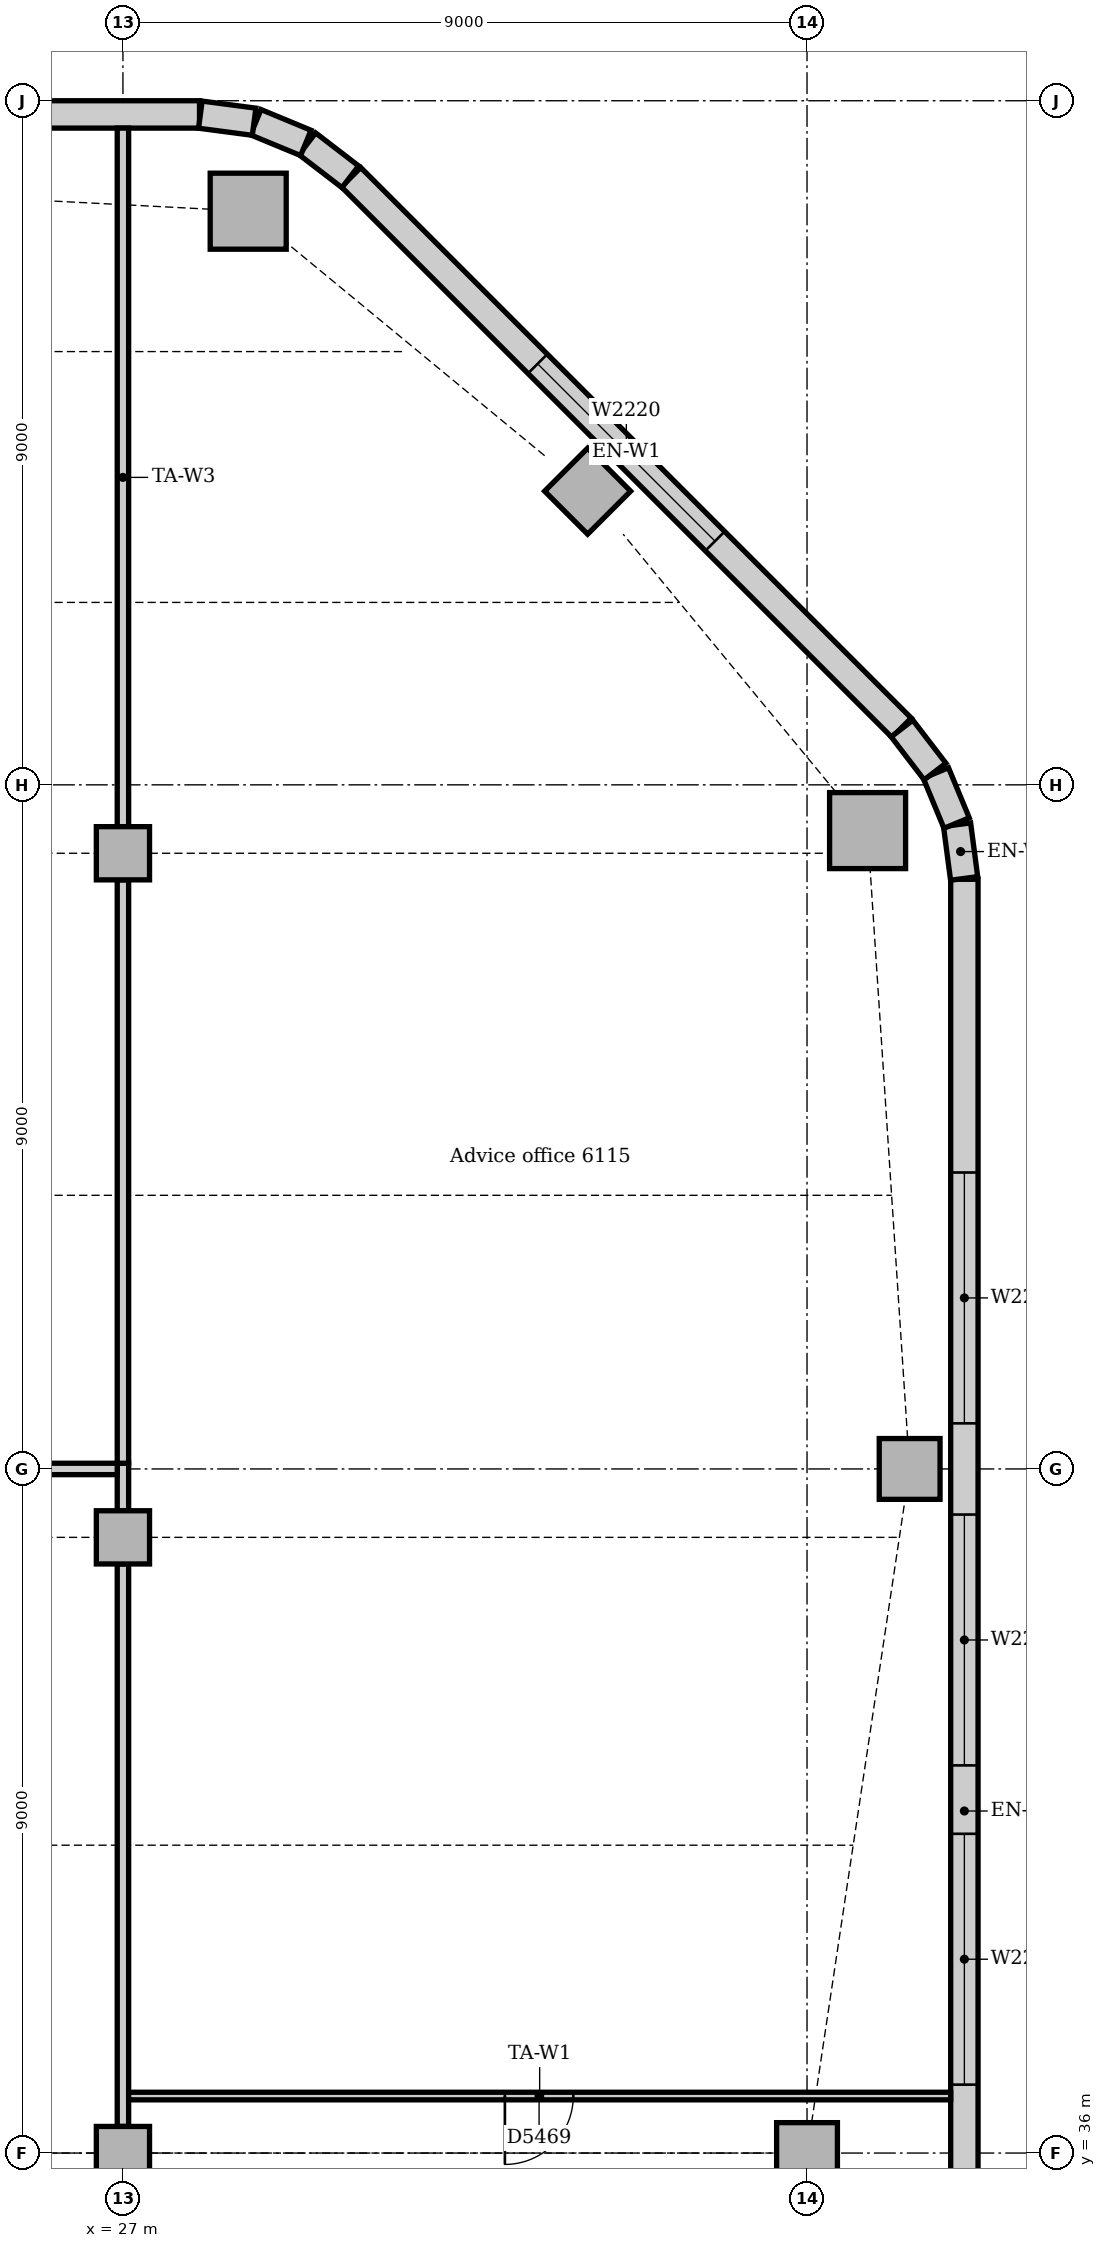
"""IFC4 building model, lengths in metres.
Left out: names, types, materials, properties, quantities, classifications, styles, units other than length and angle.
Written with IfcOpenShell. Run it as: python <this file> out.ifc"""

import sys

from ifc_helpers import new_model, si_unit, direction, frame, frame_2d, origin, origin_2d, place, context, subcontext, project, spatial, rectangle, extrude, element, fill, save


model = new_model("IFC4")
c1 = context("Model", 3, precision=1e-05, world=origin(), true_north=direction((0.0, 1.0)))
c2 = subcontext(c1, "Body", "Model", "MODEL_VIEW")
j1 = project(units=[si_unit("LENGTHUNIT", "METRE"), si_unit("PLANEANGLEUNIT", "RADIAN")], contexts=[c1])
p1 = place(None, origin())
s1 = spatial("IfcSite", under=j1, at=p1, CompositionType="ELEMENT")
p2 = place(p1, origin())
s2 = spatial("IfcBuilding", under=s1, at=p2, CompositionType="ELEMENT")
p3 = place(p2, frame((0.0, 0.0, 255.0)))
s3 = spatial("IfcBuildingStorey", under=s2, at=p3, CompositionType="ELEMENT", Elevation=255.0)
for number, where, z_axis, x_axis in (
    (1, (36.797, 53.398, 0.0), (0.0, 0.0, 1.0), (1.0, 0.0, 0.0)),
    (2, (28.648, 61.547, 0.0), (0.0, 0.0, 1.0), (1.0, 0.0, 0.0)),
):
    element("IfcColumn", number, at=place(p3, frame(where, z_axis=z_axis, x_axis=x_axis)), inside=s3, PredefinedType="COLUMN", context=c2, shape_type="SweptSolid", body=[
        extrude(rectangle(XDim=1.0, YDim=1.0, at=origin_2d()), origin(), (0.0, 0.0, 1.0), 3.85),
    ])
for number, where, z_axis, x_axis in (
    (3, (36.0, 36.0, 0.0), (0.0, 0.0, 1.0), (1.0, 0.0, 0.0)),
    (4, (37.35, 45.0, 0.0), (0.0, 0.0, 1.0), (1.0, 0.0, 0.0)),
    (5, (33.114, 57.864, 0.0), (0.0, 0.0, 1.0), (0.707, 0.707, 0.0)),
):
    element("IfcColumn", number, at=place(p3, frame(where, z_axis=z_axis, x_axis=x_axis)), inside=s3, PredefinedType="COLUMN", context=c2, shape_type="SweptSolid", body=[
        extrude(rectangle(XDim=0.8, YDim=0.8, at=origin_2d()), origin(), (0.0, 0.0, 1.0), 3.85),
    ])
for number, where, z_axis, x_axis in (
    (6, (27.0, 36.0, 0.0), (0.0, 0.0, 1.0), (1.0, 0.0, 0.0)),
    (7, (27.0, 44.1, 0.0), (0.0, 0.0, 1.0), (1.0, 0.0, 0.0)),
    (8, (27.0, 53.1, 0.0), (0.0, 0.0, 1.0), (1.0, 0.0, 0.0)),
):
    element("IfcColumn", number, at=place(p3, frame(where, z_axis=z_axis, x_axis=x_axis)), inside=s3, PredefinedType="COLUMN", context=c2, shape_type="SweptSolid", body=[
        extrude(rectangle(XDim=0.7, YDim=0.7, at=origin_2d()), origin(), (0.0, 0.0, 1.0), 3.85),
    ])
p4 = place(p3, frame((38.07, 28.243, 0.0), z_axis=(0.0, 0.0, 1.0), x_axis=(0.0, 1.0, 0.0)))
e9 = element("IfcWall", 9, at=p4, inside=s3, PredefinedType="STANDARD", context=c2, shape_type="SweptSolid", body=[
    extrude(rectangle(XDim=24.515, YDim=0.36, at=frame_2d((12.257, 0.0))), origin(), (0.0, 0.0, 1.0), 3.85),
])
p5 = place(p4, frame((3.857, 0.0, 0.9)))
e10 = element("IfcOpeningElement", 10, at=p5, cuts=e9, PredefinedType="OPENING", context=c2, shape_type="SweptSolid", body=[
    extrude(rectangle(XDim=3.3, YDim=1.6, at=frame_2d((1.65, 0.8))), frame((0.0, 0.19, 0.0), z_axis=(0.0, -1.0, 0.0), x_axis=(1.0, 0.0, 0.0)), (0.0, 0.0, 1.0), 0.38),
])
p6 = place(p4, frame((8.657, 0.0, 0.9)))
e11 = element("IfcOpeningElement", 11, at=p6, cuts=e9, PredefinedType="OPENING", context=c2, shape_type="SweptSolid", body=[
    extrude(rectangle(XDim=3.3, YDim=1.6, at=frame_2d((1.65, 0.8))), frame((0.0, 0.19, 0.0), z_axis=(0.0, -1.0, 0.0), x_axis=(1.0, 0.0, 0.0)), (0.0, 0.0, 1.0), 0.38),
])
p7 = place(p4, frame((12.857, 0.0, 0.9)))
e12 = element("IfcOpeningElement", 12, at=p7, cuts=e9, PredefinedType="OPENING", context=c2, shape_type="SweptSolid", body=[
    extrude(rectangle(XDim=3.3, YDim=1.6, at=frame_2d((1.65, 0.8))), frame((0.0, 0.19, 0.0), z_axis=(0.0, -1.0, 0.0), x_axis=(1.0, 0.0, 0.0)), (0.0, 0.0, 1.0), 0.38),
])
p8 = place(p4, frame((17.357, 0.0, 0.9)))
e13 = element("IfcOpeningElement", 13, at=p8, cuts=e9, PredefinedType="OPENING", context=c2, shape_type="SweptSolid", body=[
    extrude(rectangle(XDim=3.3, YDim=1.6, at=frame_2d((1.65, 0.8))), frame((0.0, 0.19, 0.0), z_axis=(0.0, -1.0, 0.0), x_axis=(1.0, 0.0, 0.0)), (0.0, 0.0, 1.0), 0.38),
])
p9 = place(p3, frame((37.244, 54.751, 0.0), z_axis=(0.0, 0.0, 1.0), x_axis=(-0.707106781187, 0.707106781187, 0.0)))
e14 = element("IfcWall", 14, at=p9, inside=s3, PredefinedType="STANDARD", context=c2, shape_type="SweptSolid", body=[
    extrude(rectangle(XDim=10.243, YDim=0.36, at=frame_2d((5.121, 0.0))), origin(), (0.0, 0.0, 1.0), 3.85),
])
p10 = place(p9, frame((3.471, 0.0, 0.9)))
e15 = element("IfcOpeningElement", 15, at=p10, cuts=e14, PredefinedType="OPENING", context=c2, shape_type="SweptSolid", body=[
    extrude(rectangle(XDim=3.3, YDim=1.6, at=frame_2d((1.65, 0.8))), frame((0.0, 0.19, 0.0), z_axis=(0.0, -1.0, 0.0), x_axis=(1.0, 0.0, 0.0)), (0.0, 0.0, 1.0), 0.38),
])
p11 = place(p3, frame((28.007, 62.82, 0.0), z_axis=(0.0, 0.0, 1.0), x_axis=(-1.0, 0.0, 0.0)))
e16 = element("IfcWall", 16, at=p11, inside=s3, PredefinedType="STANDARD", context=c2, shape_type="SweptSolid", body=[
    extrude(rectangle(XDim=23.765, YDim=0.36, at=frame_2d((11.882, 0.0))), origin(), (0.0, 0.0, 1.0), 3.85),
])
p12 = place(p11, frame((3.482, 0.0, 0.9)))
e17 = element("IfcOpeningElement", 17, at=p12, cuts=e16, PredefinedType="OPENING", context=c2, shape_type="SweptSolid", body=[
    extrude(rectangle(XDim=3.3, YDim=1.6, at=frame_2d((1.65, 0.8))), frame((0.0, 0.19, 0.0), z_axis=(0.0, -1.0, 0.0), x_axis=(1.0, 0.0, 0.0)), (0.0, 0.0, 1.0), 0.38),
])
p13 = place(p11, frame((8.732, 0.0, 0.9)))
e18 = element("IfcOpeningElement", 18, at=p13, cuts=e16, PredefinedType="OPENING", context=c2, shape_type="SweptSolid", body=[
    extrude(rectangle(XDim=1.8, YDim=1.6, at=frame_2d((0.9, 0.8))), frame((0.0, 0.19, 0.0), z_axis=(0.0, -1.0, 0.0), x_axis=(1.0, 0.0, 0.0)), (0.0, 0.0, 1.0), 0.38),
])
p14 = place(p11, frame((12.482, 0.0, 0.9)))
e19 = element("IfcOpeningElement", 19, at=p14, cuts=e16, PredefinedType="OPENING", context=c2, shape_type="SweptSolid", body=[
    extrude(rectangle(XDim=3.3, YDim=1.6, at=frame_2d((1.65, 0.8))), frame((0.0, 0.19, 0.0), z_axis=(0.0, -1.0, 0.0), x_axis=(1.0, 0.0, 0.0)), (0.0, 0.0, 1.0), 0.38),
])
p15 = place(p11, frame((16.982, 0.0, 0.9)))
e20 = element("IfcOpeningElement", 20, at=p15, cuts=e16, PredefinedType="OPENING", context=c2, shape_type="SweptSolid", body=[
    extrude(rectangle(XDim=3.3, YDim=1.6, at=frame_2d((1.65, 0.8))), frame((0.0, 0.19, 0.0), z_axis=(0.0, -1.0, 0.0), x_axis=(1.0, 0.0, 0.0)), (0.0, 0.0, 1.0), 0.38),
])
for number, where, z_axis, x_axis in (
    (21, (38.067, 52.769, 0.0), (0.0, 0.0, 1.0), (-0.131, 0.991, 0.0)),
    (22, (37.968, 53.497, 0.0), (0.0, 0.0, 1.0), (-0.383, 0.924, 0.0)),
):
    element("IfcWall", number, at=place(p3, frame(where, z_axis=z_axis, x_axis=x_axis)), inside=s3, PredefinedType="STANDARD", context=c2, shape_type="SweptSolid", body=[
        extrude(rectangle(XDim=0.713, YDim=0.36, at=frame_2d((0.356, 0.0))), origin(), (0.0, 0.0, 1.0), 3.85),
    ])
for number, where, z_axis, x_axis in (
    (23, (37.684, 54.175, 0.0), (0.0, 0.0, 1.0), (-0.609, 0.793, 0.0)),
    (24, (29.991, 62.0, 0.0), (0.0, 0.0, 1.0), (-0.793, 0.609, 0.0)),
):
    element("IfcWall", number, at=place(p3, frame(where, z_axis=z_axis, x_axis=x_axis)), inside=s3, PredefinedType="STANDARD", context=c2, shape_type="SweptSolid", body=[
        extrude(rectangle(XDim=0.713, YDim=0.36, at=frame_2d((0.357, 0.0))), origin(), (0.0, 0.0, 1.0), 3.85),
    ])
for number, where, z_axis, x_axis in (
    (25, (29.406, 62.445, 0.0), (0.0, 0.0, 1.0), (-0.924, 0.383, 0.0)),
    (26, (28.726, 62.724, 0.0), (0.0, 0.0, 1.0), (-0.991, 0.131, 0.0)),
):
    element("IfcWall", number, at=place(p3, frame(where, z_axis=z_axis, x_axis=x_axis)), inside=s3, PredefinedType="STANDARD", context=c2, shape_type="SweptSolid", body=[
        extrude(rectangle(XDim=0.713, YDim=0.36, at=frame_2d((0.356, 0.0))), origin(), (0.0, 0.0, 1.0), 3.85),
    ])
p16 = place(p3, frame((27.0, 36.35, 0.0), z_axis=(0.0, 0.0, 1.0), x_axis=(0.0, 1.0, 0.0)))
e27 = element("IfcWall", 27, at=p16, inside=s3, PredefinedType="PARTITIONING", context=c2, shape_type="SweptSolid", body=[
    extrude(rectangle(XDim=7.4, YDim=0.15, at=frame_2d((3.7, 0.0))), origin(), (0.0, 0.0, 1.0), 3.4),
])
p17 = place(p3, frame((27.0, 44.45, 0.0), z_axis=(0.0, 0.0, 1.0), x_axis=(0.0, 1.0, 0.0)))
e28 = element("IfcWall", 28, at=p17, inside=s3, PredefinedType="PARTITIONING", context=c2, shape_type="SweptSolid", body=[
    extrude(rectangle(XDim=0.625, YDim=0.15, at=frame_2d((0.312, 0.0))), origin(), (0.0, 0.0, 1.0), 3.4),
])
p18 = place(p3, frame((22.425, 45.0, 0.0), z_axis=(0.0, 0.0, 1.0), x_axis=(1.0, 0.0, 0.0)))
e29 = element("IfcWall", 29, at=p18, inside=s3, PredefinedType="PARTITIONING", context=c2, shape_type="SweptSolid", body=[
    extrude(rectangle(XDim=4.5, YDim=0.15, at=frame_2d((2.25, 0.0))), origin(), (0.0, 0.0, 1.0), 3.85),
])
p19 = place(p18, frame((1.75, 0.0, 0.0)))
e30 = element("IfcOpeningElement", 30, at=p19, cuts=e29, PredefinedType="OPENING", context=c2, shape_type="SweptSolid", body=[
    extrude(rectangle(XDim=1.0, YDim=2.1, at=frame_2d((0.5, 1.05))), frame((0.0, 0.085, 0.0), z_axis=(0.0, -1.0, 0.0), x_axis=(1.0, 0.0, 0.0)), (0.0, 0.0, 1.0), 0.17),
])
p20 = place(p3, frame((27.0, 53.45, 0.0), z_axis=(0.0, 0.0, 1.0), x_axis=(0.0, 1.0, 0.0)))
e31 = element("IfcWall", 31, at=p20, inside=s3, PredefinedType="PARTITIONING", context=c2, shape_type="SweptSolid", body=[
    extrude(rectangle(XDim=9.19, YDim=0.15, at=frame_2d((4.595, 0.0))), origin(), (0.0, 0.0, 1.0), 3.4),
])
p21 = place(p3, frame((27.0, 45.075, 0.0), z_axis=(0.0, 0.0, 1.0), x_axis=(0.0, 1.0, 0.0)))
e32 = element("IfcWall", 32, at=p21, inside=s3, PredefinedType="PARTITIONING", context=c2, shape_type="SweptSolid", body=[
    extrude(rectangle(XDim=7.675, YDim=0.15, at=frame_2d((3.837, 0.0))), origin(), (0.0, 0.0, 1.0), 3.4),
])
p22 = place(p3, frame((27.075, 36.75, 0.0), z_axis=(0.0, 0.0, 1.0), x_axis=(1.0, 0.0, 0.0)))
e33 = element("IfcWall", 33, at=p22, inside=s3, PredefinedType="PARTITIONING", context=c2, shape_type="SweptSolid", body=[
    extrude(rectangle(XDim=10.815, YDim=0.1, at=frame_2d((5.407, 0.0))), origin(), (0.0, 0.0, 1.0), 3.85),
])
p23 = place(p22, frame((4.95, 0.0, 0.0)))
e34 = element("IfcOpeningElement", 34, at=p23, cuts=e33, PredefinedType="OPENING", context=c2, shape_type="SweptSolid", body=[
    extrude(rectangle(XDim=0.9, YDim=2.1, at=frame_2d((0.45, 1.05))), frame((0.0, 0.06, 0.0), z_axis=(0.0, -1.0, 0.0), x_axis=(1.0, 0.0, 0.0)), (0.0, 0.0, 1.0), 0.12),
])
p24 = place(p6, origin())
e35 = element("IfcWindow", 35, at=p24, inside=s3, PartitioningType="SINGLE_PANEL", PredefinedType="WINDOW", context=c2, shape_type="SweptSolid", body=[
    extrude(rectangle(XDim=3.3, YDim=1.6, at=frame_2d((1.65, 0.8))), frame((0.0, 0.13, 0.0), z_axis=(0.0, -1.0, 0.0), x_axis=(1.0, 0.0, 0.0)), (0.0, 0.0, 1.0), 0.06),
])
fill(e11, e35)
p25 = place(p7, origin())
e36 = element("IfcWindow", 36, at=p25, inside=s3, PartitioningType="SINGLE_PANEL", PredefinedType="WINDOW", context=c2, shape_type="SweptSolid", body=[
    extrude(rectangle(XDim=3.3, YDim=1.6, at=frame_2d((1.65, 0.8))), frame((0.0, 0.13, 0.0), z_axis=(0.0, -1.0, 0.0), x_axis=(1.0, 0.0, 0.0)), (0.0, 0.0, 1.0), 0.06),
])
fill(e12, e36)
p26 = place(p8, origin())
e37 = element("IfcWindow", 37, at=p26, inside=s3, PartitioningType="SINGLE_PANEL", PredefinedType="WINDOW", context=c2, shape_type="SweptSolid", body=[
    extrude(rectangle(XDim=3.3, YDim=1.6, at=frame_2d((1.65, 0.8))), frame((0.0, 0.13, 0.0), z_axis=(0.0, -1.0, 0.0), x_axis=(1.0, 0.0, 0.0)), (0.0, 0.0, 1.0), 0.06),
])
fill(e13, e37)
p27 = place(p10, origin())
e38 = element("IfcWindow", 38, at=p27, inside=s3, PartitioningType="SINGLE_PANEL", PredefinedType="WINDOW", context=c2, shape_type="SweptSolid", body=[
    extrude(rectangle(XDim=3.3, YDim=1.6, at=frame_2d((1.65, 0.8))), frame((0.0, 0.13, 0.0), z_axis=(0.0, -1.0, 0.0), x_axis=(1.0, 0.0, 0.0)), (0.0, 0.0, 1.0), 0.06),
])
fill(e15, e38)
p28 = place(p23, frame((0.9, 0.0, 0.0), z_axis=(0.0, 0.0, 1.0), x_axis=(-1.0, 0.0, 0.0)))
e39 = element("IfcDoor", 39, at=p28, inside=s3, OperationType="SINGLE_SWING_RIGHT", PredefinedType="DOOR", context=c2, shape_type="SweptSolid", body=[
    extrude(rectangle(XDim=0.9, YDim=2.1, at=frame_2d((0.45, 1.05))), frame((0.0, 0.025, 0.0), z_axis=(0.0, -1.0, 0.0), x_axis=(1.0, 0.0, 0.0)), (0.0, 0.0, 1.0), 0.05),
])
fill(e34, e39)
save(model, sys.argv[1])
